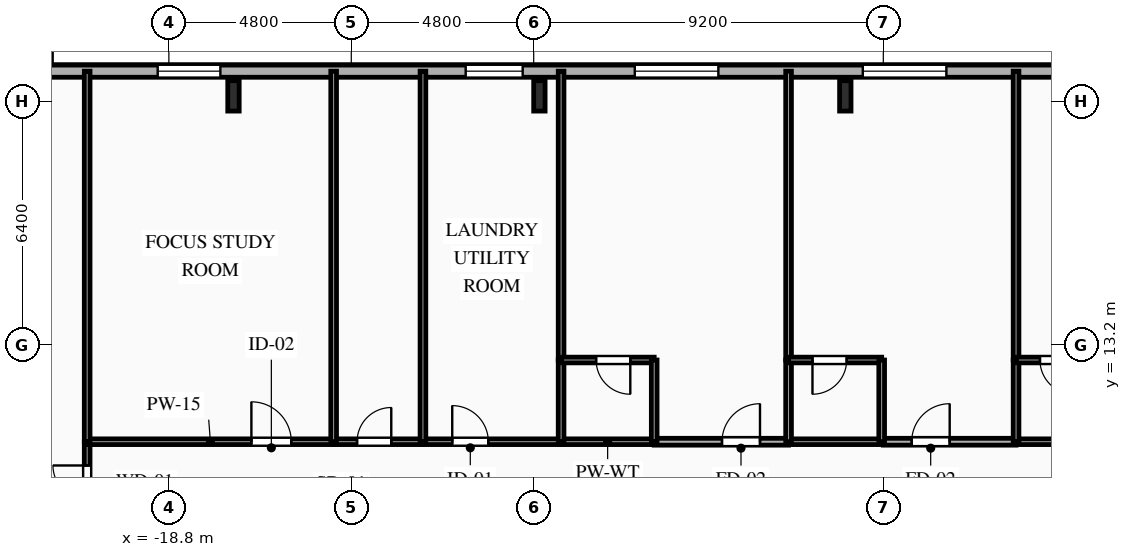
"""IFC4 building model, lengths in metres.
Left out: names, types, materials, properties, quantities, classifications, styles, units other than length and angle.
Written with IfcOpenShell. Run it as: python <this file> out.ifc"""

import sys

from ifc_helpers import new_model, si_unit, direction, frame, frame_2d, origin, origin_2d, place, context, subcontext, project, spatial, rectangle, i_section, extrude, element, fill, save


model = new_model("IFC4")
c1 = context("Model", 3, precision=1e-05, world=origin(), true_north=direction((0.0, 1.0)))
c2 = subcontext(c1, "Body", "Model", "MODEL_VIEW")
j1 = project(units=[si_unit("LENGTHUNIT", "METRE"), si_unit("PLANEANGLEUNIT", "RADIAN")], contexts=[c1])
p1 = place(None, origin())
s1 = spatial("IfcSite", under=j1, at=p1, CompositionType="ELEMENT")
p2 = place(p1, origin())
s2 = spatial("IfcBuilding", under=s1, at=p2, CompositionType="ELEMENT")
p3 = place(p2, frame((0.0, 0.0, 137.7)))
s3 = spatial("IfcBuildingStorey", under=s2, at=p3, CompositionType="ELEMENT", Elevation=137.7)
for number, where, z_axis, x_axis in (
    (1, (-1.0, 19.75, 0.0), (0.0, 0.0, 1.0), (1.0, 0.0, 0.0)),
    (2, (-9.05, 19.75, 0.0), (0.0, 0.0, 1.0), (1.0, 0.0, 0.0)),
    (3, (-17.1, 19.75, 0.0), (0.0, 0.0, 1.0), (1.0, 0.0, 0.0)),
):
    element("IfcColumn", number, at=place(p3, frame(where, z_axis=z_axis, x_axis=x_axis)), inside=s3, PredefinedType="COLUMN", context=c2, shape_type="SweptSolid", body=[
        extrude(i_section(OverallWidth=0.3, OverallDepth=0.8, WebThickness=0.018, FlangeThickness=0.033, FilletRadius=0.03, at=origin_2d()), origin(), (0.0, 0.0, 1.0), 3.35),
    ])
p4 = place(p3, frame((-25.8, 20.4, 0.0), z_axis=(0.0, 0.0, 1.0), x_axis=(1.0, 0.0, 0.0)))
e4 = element("IfcWall", 4, at=p4, inside=s3, PredefinedType="SOLIDWALL", context=c2, shape_type="SweptSolid", body=[
    extrude(rectangle(XDim=49.6, YDim=0.32, at=frame_2d((24.8, 0.0))), origin(), (0.0, 0.0, 1.0), 3.04),
])
p5 = place(p4, frame((2.135, 0.0, 0.85)))
e5 = element("IfcOpeningElement", 5, at=p5, cuts=e4, PredefinedType="OPENING", context=c2, shape_type="SweptSolid", body=[
    extrude(rectangle(XDim=1.65, YDim=1.85, at=frame_2d((0.825, 0.925))), frame((0.0, 0.17, 0.0), z_axis=(0.0, -1.0, 0.0), x_axis=(1.0, 0.0, 0.0)), (0.0, 0.0, 1.0), 0.34),
])
p6 = place(p4, frame((6.706, 0.0, 0.85)))
e6 = element("IfcOpeningElement", 6, at=p6, cuts=e4, PredefinedType="OPENING", context=c2, shape_type="SweptSolid", body=[
    extrude(rectangle(XDim=1.65, YDim=1.85, at=frame_2d((0.825, 0.925))), frame((0.0, 0.17, 0.0), z_axis=(0.0, -1.0, 0.0), x_axis=(1.0, 0.0, 0.0)), (0.0, 0.0, 1.0), 0.34),
])
p7 = place(p4, frame((14.81, 0.0, 0.85)))
e7 = element("IfcOpeningElement", 7, at=p7, cuts=e4, PredefinedType="OPENING", context=c2, shape_type="SweptSolid", body=[
    extrude(rectangle(XDim=1.5, YDim=1.85, at=frame_2d((0.75, 0.925))), frame((0.0, 0.17, 0.0), z_axis=(0.0, -1.0, 0.0), x_axis=(1.0, 0.0, 0.0)), (0.0, 0.0, 1.0), 0.34),
])
p8 = place(p4, frame((19.26, 0.0, 0.85)))
e8 = element("IfcOpeningElement", 8, at=p8, cuts=e4, PredefinedType="OPENING", context=c2, shape_type="SweptSolid", body=[
    extrude(rectangle(XDim=2.2, YDim=1.85, at=frame_2d((1.1, 0.925))), frame((0.0, 0.17, 0.0), z_axis=(0.0, -1.0, 0.0), x_axis=(1.0, 0.0, 0.0)), (0.0, 0.0, 1.0), 0.34),
])
p9 = place(p4, frame((25.26, 0.0, 0.85)))
e9 = element("IfcOpeningElement", 9, at=p9, cuts=e4, PredefinedType="OPENING", context=c2, shape_type="SweptSolid", body=[
    extrude(rectangle(XDim=2.2, YDim=1.85, at=frame_2d((1.1, 0.925))), frame((0.0, 0.17, 0.0), z_axis=(0.0, -1.0, 0.0), x_axis=(1.0, 0.0, 0.0)), (0.0, 0.0, 1.0), 0.34),
])
p10 = place(p4, frame((30.4, 0.0, 0.85)))
e10 = element("IfcOpeningElement", 10, at=p10, cuts=e4, PredefinedType="OPENING", context=c2, shape_type="SweptSolid", body=[
    extrude(rectangle(XDim=2.2, YDim=1.85, at=frame_2d((1.1, 0.925))), frame((0.0, 0.17, 0.0), z_axis=(0.0, -1.0, 0.0), x_axis=(1.0, 0.0, 0.0)), (0.0, 0.0, 1.0), 0.34),
])
p11 = place(p4, frame((37.18, 0.0, 0.85)))
e11 = element("IfcOpeningElement", 11, at=p11, cuts=e4, PredefinedType="OPENING", context=c2, shape_type="SweptSolid", body=[
    extrude(rectangle(XDim=2.2, YDim=1.85, at=frame_2d((1.1, 0.925))), frame((0.0, 0.17, 0.0), z_axis=(0.0, -1.0, 0.0), x_axis=(1.0, 0.0, 0.0)), (0.0, 0.0, 1.0), 0.34),
])
p12 = place(p4, frame((43.215, 0.0, 0.85)))
e12 = element("IfcOpeningElement", 12, at=p12, cuts=e4, PredefinedType="OPENING", context=c2, shape_type="SweptSolid", body=[
    extrude(rectangle(XDim=1.65, YDim=1.85, at=frame_2d((0.825, 0.925))), frame((0.0, 0.17, 0.0), z_axis=(0.0, -1.0, 0.0), x_axis=(1.0, 0.0, 0.0)), (0.0, 0.0, 1.0), 0.34),
])
p13 = place(p4, frame((47.45, 0.0, 0.85)))
e13 = element("IfcOpeningElement", 13, at=p13, cuts=e4, PredefinedType="OPENING", context=c2, shape_type="SweptSolid", body=[
    extrude(rectangle(XDim=1.1, YDim=1.85, at=frame_2d((0.55, 0.925))), frame((0.0, 0.17, 0.0), z_axis=(0.0, -1.0, 0.0), x_axis=(1.0, 0.0, 0.0)), (0.0, 0.0, 1.0), 0.34),
])
p14 = place(p3, frame((-20.95, 8.5, 0.0), z_axis=(0.0, 0.0, 1.0), x_axis=(0.0, 1.0, 0.0)))
e14 = element("IfcWall", 14, at=p14, inside=s3, PredefinedType="PARTITIONING", context=c2, shape_type="SweptSolid", body=[
    extrude(rectangle(XDim=2.15, YDim=0.15, at=frame_2d((1.075, 0.0))), origin(), (0.0, 0.0, 1.0), 3.04),
])
p15 = place(p14, frame((0.625, 0.0, 0.0)))
e15 = element("IfcOpeningElement", 15, at=p15, cuts=e14, PredefinedType="OPENING", context=c2, shape_type="SweptSolid", body=[
    extrude(rectangle(XDim=0.9, YDim=2.1, at=frame_2d((0.45, 1.05))), frame((0.0, 0.085, 0.0), z_axis=(0.0, -1.0, 0.0), x_axis=(1.0, 0.0, 0.0)), (0.0, 0.0, 1.0), 0.17),
])
p16 = place(p3, frame((-20.95, 10.65, 0.0), z_axis=(0.0, 0.0, 1.0), x_axis=(1.0, 0.0, 0.0)))
e16 = element("IfcWall", 16, at=p16, inside=s3, PredefinedType="PARTITIONING", context=c2, shape_type="SweptSolid", body=[
    extrude(rectangle(XDim=6.486, YDim=0.15, at=frame_2d((3.243, 0.0))), origin(), (0.0, 0.0, 1.0), 3.04),
])
p17 = place(p16, frame((4.322, 0.0, 0.0)))
e17 = element("IfcOpeningElement", 17, at=p17, cuts=e16, PredefinedType="OPENING", context=c2, shape_type="SweptSolid", body=[
    extrude(rectangle(XDim=1.05, YDim=2.15, at=frame_2d((0.525, 1.075))), frame((0.0, 0.085, 0.0), z_axis=(0.0, -1.0, 0.0), x_axis=(1.0, 0.0, 0.0)), (0.0, 0.0, 1.0), 0.17),
])
p18 = place(p3, frame((-14.464, 10.65, 0.0), z_axis=(0.0, 0.0, 1.0), x_axis=(1.0, 0.0, 0.0)))
e18 = element("IfcWall", 18, at=p18, inside=s3, PredefinedType="PLUMBINGWALL", context=c2, shape_type="SweptSolid", body=[
    extrude(rectangle(XDim=2.35, YDim=0.15, at=frame_2d((1.175, 0.0))), origin(), (0.0, 0.0, 1.0), 3.04),
])
p19 = place(p18, frame((0.616, 0.0, 0.0)))
e19 = element("IfcOpeningElement", 19, at=p19, cuts=e18, PredefinedType="OPENING", context=c2, shape_type="SweptSolid", body=[
    extrude(rectangle(XDim=0.9, YDim=2.1, at=frame_2d((0.45, 1.05))), frame((0.0, 0.085, 0.0), z_axis=(0.0, -1.0, 0.0), x_axis=(1.0, 0.0, 0.0)), (0.0, 0.0, 1.0), 0.17),
])
p20 = place(p3, frame((-12.114, 10.65, 0.0), z_axis=(0.0, 0.0, 1.0), x_axis=(1.0, 0.0, 0.0)))
e20 = element("IfcWall", 20, at=p20, inside=s3, PredefinedType="PARTITIONING", context=c2, shape_type="SweptSolid", body=[
    extrude(rectangle(XDim=3.635, YDim=0.15, at=frame_2d((1.817, 0.0))), origin(), (0.0, 0.0, 1.0), 3.04),
])
p21 = place(p20, frame((0.771, 0.0, 0.0)))
e21 = element("IfcOpeningElement", 21, at=p21, cuts=e20, PredefinedType="OPENING", context=c2, shape_type="SweptSolid", body=[
    extrude(rectangle(XDim=0.95, YDim=2.1, at=frame_2d((0.475, 1.05))), frame((0.0, 0.085, 0.0), z_axis=(0.0, -1.0, 0.0), x_axis=(1.0, 0.0, 0.0)), (0.0, 0.0, 1.0), 0.17),
])
p22 = place(p3, frame((-6.029, 10.65, 0.0), z_axis=(0.0, 0.0, 1.0), x_axis=(1.0, 0.0, 0.0)))
e22 = element("IfcWall", 22, at=p22, inside=s3, PredefinedType="PARTITIONING", context=c2, shape_type="SweptSolid", body=[
    extrude(rectangle(XDim=3.536, YDim=0.18, at=frame_2d((1.768, 0.0))), origin(), (0.0, 0.0, 1.0), 3.04),
])
p23 = place(p22, frame((1.784, 0.0, 0.0)))
e23 = element("IfcOpeningElement", 23, at=p23, cuts=e22, PredefinedType="OPENING", context=c2, shape_type="SweptSolid", body=[
    extrude(rectangle(XDim=1.0, YDim=2.15, at=frame_2d((0.5, 1.075))), frame((0.0, 0.1, 0.0), z_axis=(0.0, -1.0, 0.0), x_axis=(1.0, 0.0, 0.0)), (0.0, 0.0, 1.0), 0.2),
])
for number, where, z_axis, x_axis in (
    (24, (-8.479, 10.65, 0.0), (0.0, 0.0, 1.0), (1.0, 0.0, 0.0)),
    (25, (-2.493, 10.65, 0.0), (0.0, 0.0, 1.0), (1.0, 0.0, 0.0)),
):
    element("IfcWall", number, at=place(p3, frame(where, z_axis=z_axis, x_axis=x_axis)), inside=s3, PredefinedType="PLUMBINGWALL", context=c2, shape_type="SweptSolid", body=[
        extrude(rectangle(XDim=2.45, YDim=0.15, at=frame_2d((1.225, 0.0))), origin(), (0.0, 0.0, 1.0), 3.04),
    ])
p24 = place(p3, frame((0.0, 10.65, 0.0), z_axis=(0.0, 0.0, 1.0), x_axis=(1.0, 0.0, 0.0)))
e26 = element("IfcWall", 26, at=p24, inside=s3, PredefinedType="PARTITIONING", context=c2, shape_type="SweptSolid", body=[
    extrude(rectangle(XDim=3.493, YDim=0.18, at=frame_2d((1.747, 0.0))), origin(), (0.0, 0.0, 1.0), 3.04),
])
p25 = place(p24, frame((0.747, 0.0, 0.0)))
e27 = element("IfcOpeningElement", 27, at=p25, cuts=e26, PredefinedType="OPENING", context=c2, shape_type="SweptSolid", body=[
    extrude(rectangle(XDim=1.0, YDim=2.15, at=frame_2d((0.5, 1.075))), frame((0.0, 0.1, 0.0), z_axis=(0.0, -1.0, 0.0), x_axis=(1.0, 0.0, 0.0)), (0.0, 0.0, 1.0), 0.2),
])
p26 = place(p3, frame((3.493, 10.65, 0.0), z_axis=(0.0, 0.0, 1.0), x_axis=(1.0, 0.0, 0.0)))
e28 = element("IfcWall", 28, at=p26, inside=s3, PredefinedType="PLUMBINGWALL", context=c2, shape_type="SweptSolid", body=[
    extrude(rectangle(XDim=2.45, YDim=0.15, at=frame_2d((1.225, 0.0))), origin(), (0.0, 0.0, 1.0), 3.04),
])
p27 = place(p3, frame((-20.95, 20.4, 0.0), z_axis=(0.0, 0.0, 1.0), x_axis=(0.0, -1.0, 0.0)))
e29 = element("IfcWall", 29, at=p27, inside=s3, PredefinedType="PARTITIONING", context=c2, shape_type="SweptSolid", body=[
    extrude(rectangle(XDim=9.75, YDim=0.15, at=frame_2d((4.875, 0.0))), origin(), (0.0, 0.0, 1.0), 3.04),
])
for number, where, z_axis, x_axis in (
    (30, (-14.464, 20.4, 0.0), (0.0, 0.0, 1.0), (0.0, -1.0, 0.0)),
    (31, (-12.114, 20.4, 0.0), (0.0, 0.0, 1.0), (0.0, -1.0, 0.0)),
):
    element("IfcWall", number, at=place(p3, frame(where, z_axis=z_axis, x_axis=x_axis)), inside=s3, PredefinedType="PLUMBINGWALL", context=c2, shape_type="SweptSolid", body=[
        extrude(rectangle(XDim=9.75, YDim=0.15, at=frame_2d((4.875, 0.0))), origin(), (0.0, 0.0, 1.0), 3.04),
    ])
p28 = place(p3, frame((-8.479, 20.4, 0.0), z_axis=(0.0, 0.0, 1.0), x_axis=(0.0, -1.0, 0.0)))
e32 = element("IfcWall", 32, at=p28, inside=s3, PredefinedType="PARTITIONING", context=c2, shape_type="SweptSolid", body=[
    extrude(rectangle(XDim=7.6, YDim=0.15, at=frame_2d((3.8, 0.0))), origin(), (0.0, 0.0, 1.0), 3.04),
])
p29 = place(p3, frame((-8.479, 12.8, 0.0), z_axis=(0.0, 0.0, 1.0), x_axis=(0.0, -1.0, 0.0)))
e33 = element("IfcWall", 33, at=p29, inside=s3, PredefinedType="PLUMBINGWALL", context=c2, shape_type="SweptSolid", body=[
    extrude(rectangle(XDim=2.15, YDim=0.15, at=frame_2d((1.075, 0.0))), origin(), (0.0, 0.0, 1.0), 3.04),
])
p30 = place(p3, frame((-6.029, 12.8, 0.0), z_axis=(0.0, 0.0, 1.0), x_axis=(-1.0, 0.0, 0.0)))
e34 = element("IfcWall", 34, at=p30, inside=s3, PredefinedType="PLUMBINGWALL", context=c2, shape_type="SweptSolid", body=[
    extrude(rectangle(XDim=2.45, YDim=0.15, at=frame_2d((1.225, 0.0))), origin(), (0.0, 0.0, 1.0), 3.04),
])
p31 = place(p30, frame((0.629, 0.0, 0.0)))
e35 = element("IfcOpeningElement", 35, at=p31, cuts=e34, PredefinedType="OPENING", context=c2, shape_type="SweptSolid", body=[
    extrude(rectangle(XDim=0.9, YDim=2.1, at=frame_2d((0.45, 1.05))), frame((0.0, 0.085, 0.0), z_axis=(0.0, -1.0, 0.0), x_axis=(1.0, 0.0, 0.0)), (0.0, 0.0, 1.0), 0.17),
])
p32 = place(p3, frame((-6.029, 10.65, 0.0), z_axis=(0.0, 0.0, 1.0), x_axis=(0.0, 1.0, 0.0)))
e36 = element("IfcWall", 36, at=p32, inside=s3, PredefinedType="PLUMBINGWALL", context=c2, shape_type="SweptSolid", body=[
    extrude(rectangle(XDim=2.15, YDim=0.15, at=frame_2d((1.075, 0.0))), origin(), (0.0, 0.0, 1.0), 3.04),
])
p33 = place(p3, frame((-2.493, 20.4, 0.0), z_axis=(0.0, 0.0, 1.0), x_axis=(0.0, -1.0, 0.0)))
e37 = element("IfcWall", 37, at=p33, inside=s3, PredefinedType="PARTITIONING", context=c2, shape_type="SweptSolid", body=[
    extrude(rectangle(XDim=7.6, YDim=0.15, at=frame_2d((3.8, 0.0))), origin(), (0.0, 0.0, 1.0), 3.04),
])
p34 = place(p3, frame((-2.493, 12.8, 0.0), z_axis=(0.0, 0.0, 1.0), x_axis=(0.0, -1.0, 0.0)))
e38 = element("IfcWall", 38, at=p34, inside=s3, PredefinedType="PLUMBINGWALL", context=c2, shape_type="SweptSolid", body=[
    extrude(rectangle(XDim=2.15, YDim=0.15, at=frame_2d((1.075, 0.0))), origin(), (0.0, 0.0, 1.0), 3.04),
])
p35 = place(p3, frame((-0.043, 12.8, 0.0), z_axis=(0.0, 0.0, 1.0), x_axis=(-1.0, 0.0, 0.0)))
e39 = element("IfcWall", 39, at=p35, inside=s3, PredefinedType="PLUMBINGWALL", context=c2, shape_type="SweptSolid", body=[
    extrude(rectangle(XDim=2.45, YDim=0.15, at=frame_2d((1.225, 0.0))), origin(), (0.0, 0.0, 1.0), 3.04),
])
p36 = place(p35, frame((0.921, 0.0, 0.0)))
e40 = element("IfcOpeningElement", 40, at=p36, cuts=e39, PredefinedType="OPENING", context=c2, shape_type="SweptSolid", body=[
    extrude(rectangle(XDim=0.9, YDim=2.1, at=frame_2d((0.45, 1.05))), frame((0.0, 0.085, 0.0), z_axis=(0.0, -1.0, 0.0), x_axis=(1.0, 0.0, 0.0)), (0.0, 0.0, 1.0), 0.17),
])
p37 = place(p3, frame((-0.043, 10.65, 0.0), z_axis=(0.0, 0.0, 1.0), x_axis=(0.0, 1.0, 0.0)))
e41 = element("IfcWall", 41, at=p37, inside=s3, PredefinedType="PLUMBINGWALL", context=c2, shape_type="SweptSolid", body=[
    extrude(rectangle(XDim=2.15, YDim=0.15, at=frame_2d((1.075, 0.0))), origin(), (0.0, 0.0, 1.0), 3.04),
])
p38 = place(p3, frame((3.493, 20.4, 0.0), z_axis=(0.0, 0.0, 1.0), x_axis=(0.0, -1.0, 0.0)))
e42 = element("IfcWall", 42, at=p38, inside=s3, PredefinedType="PARTITIONING", context=c2, shape_type="SweptSolid", body=[
    extrude(rectangle(XDim=7.6, YDim=0.15, at=frame_2d((3.8, 0.0))), origin(), (0.0, 0.0, 1.0), 3.04),
])
p39 = place(p3, frame((3.493, 12.8, 0.0), z_axis=(0.0, 0.0, 1.0), x_axis=(0.0, -1.0, 0.0)))
e43 = element("IfcWall", 43, at=p39, inside=s3, PredefinedType="PLUMBINGWALL", context=c2, shape_type="SweptSolid", body=[
    extrude(rectangle(XDim=2.15, YDim=0.15, at=frame_2d((1.075, 0.0))), origin(), (0.0, 0.0, 1.0), 3.04),
])
p40 = place(p3, frame((5.943, 12.8, 0.0), z_axis=(0.0, 0.0, 1.0), x_axis=(-1.0, 0.0, 0.0)))
e44 = element("IfcWall", 44, at=p40, inside=s3, PredefinedType="PLUMBINGWALL", context=c2, shape_type="SweptSolid", body=[
    extrude(rectangle(XDim=2.45, YDim=0.15, at=frame_2d((1.225, 0.0))), origin(), (0.0, 0.0, 1.0), 3.04),
])
p41 = place(p40, frame((0.921, 0.0, 0.0)))
e45 = element("IfcOpeningElement", 45, at=p41, cuts=e44, PredefinedType="OPENING", context=c2, shape_type="SweptSolid", body=[
    extrude(rectangle(XDim=0.9, YDim=2.1, at=frame_2d((0.45, 1.05))), frame((0.0, 0.085, 0.0), z_axis=(0.0, -1.0, 0.0), x_axis=(1.0, 0.0, 0.0)), (0.0, 0.0, 1.0), 0.17),
])
p42 = place(p6, origin())
e46 = element("IfcWindow", 46, at=p42, inside=s3, PartitioningType="SINGLE_PANEL", PredefinedType="WINDOW", context=c2, shape_type="SweptSolid", body=[
    extrude(rectangle(XDim=1.65, YDim=1.85, at=frame_2d((0.825, 0.925))), frame((0.0, 0.03, 0.0), z_axis=(0.0, -1.0, 0.0), x_axis=(1.0, 0.0, 0.0)), (0.0, 0.0, 1.0), 0.06),
])
fill(e6, e46)
p43 = place(p7, origin())
e47 = element("IfcWindow", 47, at=p43, inside=s3, PartitioningType="SINGLE_PANEL", PredefinedType="WINDOW", context=c2, shape_type="SweptSolid", body=[
    extrude(rectangle(XDim=1.5, YDim=1.85, at=frame_2d((0.75, 0.925))), frame((0.0, 0.03, 0.0), z_axis=(0.0, -1.0, 0.0), x_axis=(1.0, 0.0, 0.0)), (0.0, 0.0, 1.0), 0.06),
])
fill(e7, e47)
p44 = place(p8, origin())
e48 = element("IfcWindow", 48, at=p44, inside=s3, PartitioningType="SINGLE_PANEL", PredefinedType="WINDOW", context=c2, shape_type="SweptSolid", body=[
    extrude(rectangle(XDim=2.2, YDim=1.85, at=frame_2d((1.1, 0.925))), frame((0.0, 0.03, 0.0), z_axis=(0.0, -1.0, 0.0), x_axis=(1.0, 0.0, 0.0)), (0.0, 0.0, 1.0), 0.06),
])
fill(e8, e48)
p45 = place(p9, origin())
e49 = element("IfcWindow", 49, at=p45, inside=s3, PartitioningType="SINGLE_PANEL", PredefinedType="WINDOW", context=c2, shape_type="SweptSolid", body=[
    extrude(rectangle(XDim=2.2, YDim=1.85, at=frame_2d((1.1, 0.925))), frame((0.0, 0.03, 0.0), z_axis=(0.0, -1.0, 0.0), x_axis=(1.0, 0.0, 0.0)), (0.0, 0.0, 1.0), 0.06),
])
fill(e9, e49)
p46 = place(p15, origin())
e50 = element("IfcDoor", 50, at=p46, inside=s3, OperationType="SINGLE_SWING_RIGHT", PredefinedType="DOOR", context=c2, shape_type="SweptSolid", body=[
    extrude(rectangle(XDim=0.9, YDim=2.1, at=frame_2d((0.45, 1.05))), frame((0.0, 0.025, 0.0), z_axis=(0.0, -1.0, 0.0), x_axis=(1.0, 0.0, 0.0)), (0.0, 0.0, 1.0), 0.05),
])
fill(e15, e50)
p47 = place(p17, origin())
e51 = element("IfcDoor", 51, at=p47, inside=s3, OperationType="SINGLE_SWING_LEFT", PredefinedType="DOOR", context=c2, shape_type="SweptSolid", body=[
    extrude(rectangle(XDim=1.05, YDim=2.15, at=frame_2d((0.525, 1.075))), frame((0.0, 0.025, 0.0), z_axis=(0.0, -1.0, 0.0), x_axis=(1.0, 0.0, 0.0)), (0.0, 0.0, 1.0), 0.05),
])
fill(e17, e51)
p48 = place(p19, origin())
e52 = element("IfcDoor", 52, at=p48, inside=s3, OperationType="SINGLE_SWING_RIGHT", PredefinedType="DOOR", context=c2, shape_type="SweptSolid", body=[
    extrude(rectangle(XDim=0.9, YDim=2.1, at=frame_2d((0.45, 1.05))), frame((0.0, 0.025, 0.0), z_axis=(0.0, -1.0, 0.0), x_axis=(1.0, 0.0, 0.0)), (0.0, 0.0, 1.0), 0.05),
])
fill(e19, e52)
p49 = place(p21, origin())
e53 = element("IfcDoor", 53, at=p49, inside=s3, OperationType="SINGLE_SWING_LEFT", PredefinedType="DOOR", context=c2, shape_type="SweptSolid", body=[
    extrude(rectangle(XDim=0.95, YDim=2.1, at=frame_2d((0.475, 1.05))), frame((0.0, 0.025, 0.0), z_axis=(0.0, -1.0, 0.0), x_axis=(1.0, 0.0, 0.0)), (0.0, 0.0, 1.0), 0.05),
])
fill(e21, e53)
p50 = place(p23, origin())
e54 = element("IfcDoor", 54, at=p50, inside=s3, OperationType="SINGLE_SWING_RIGHT", PredefinedType="DOOR", context=c2, shape_type="SweptSolid", body=[
    extrude(rectangle(XDim=1.0, YDim=2.15, at=frame_2d((0.5, 1.075))), frame((0.0, 0.025, 0.0), z_axis=(0.0, -1.0, 0.0), x_axis=(1.0, 0.0, 0.0)), (0.0, 0.0, 1.0), 0.05),
])
fill(e23, e54)
p51 = place(p25, origin())
e55 = element("IfcDoor", 55, at=p51, inside=s3, OperationType="SINGLE_SWING_RIGHT", PredefinedType="DOOR", context=c2, shape_type="SweptSolid", body=[
    extrude(rectangle(XDim=1.0, YDim=2.15, at=frame_2d((0.5, 1.075))), frame((0.0, 0.025, 0.0), z_axis=(0.0, -1.0, 0.0), x_axis=(1.0, 0.0, 0.0)), (0.0, 0.0, 1.0), 0.05),
])
fill(e27, e55)
p52 = place(p31, origin())
e56 = element("IfcDoor", 56, at=p52, inside=s3, OperationType="SINGLE_SWING_LEFT", PredefinedType="DOOR", context=c2, shape_type="SweptSolid", body=[
    extrude(rectangle(XDim=0.9, YDim=2.1, at=frame_2d((0.45, 1.05))), frame((0.0, 0.025, 0.0), z_axis=(0.0, -1.0, 0.0), x_axis=(1.0, 0.0, 0.0)), (0.0, 0.0, 1.0), 0.05),
])
fill(e35, e56)
p53 = place(p36, origin())
e57 = element("IfcDoor", 57, at=p53, inside=s3, OperationType="SINGLE_SWING_RIGHT", PredefinedType="DOOR", context=c2, shape_type="SweptSolid", body=[
    extrude(rectangle(XDim=0.9, YDim=2.1, at=frame_2d((0.45, 1.05))), frame((0.0, 0.025, 0.0), z_axis=(0.0, -1.0, 0.0), x_axis=(1.0, 0.0, 0.0)), (0.0, 0.0, 1.0), 0.05),
])
fill(e40, e57)
p54 = place(p41, origin())
e58 = element("IfcDoor", 58, at=p54, inside=s3, OperationType="SINGLE_SWING_LEFT", PredefinedType="DOOR", context=c2, shape_type="SweptSolid", body=[
    extrude(rectangle(XDim=0.9, YDim=2.1, at=frame_2d((0.45, 1.05))), frame((0.0, 0.025, 0.0), z_axis=(0.0, -1.0, 0.0), x_axis=(1.0, 0.0, 0.0)), (0.0, 0.0, 1.0), 0.05),
])
fill(e45, e58)
save(model, sys.argv[1])
